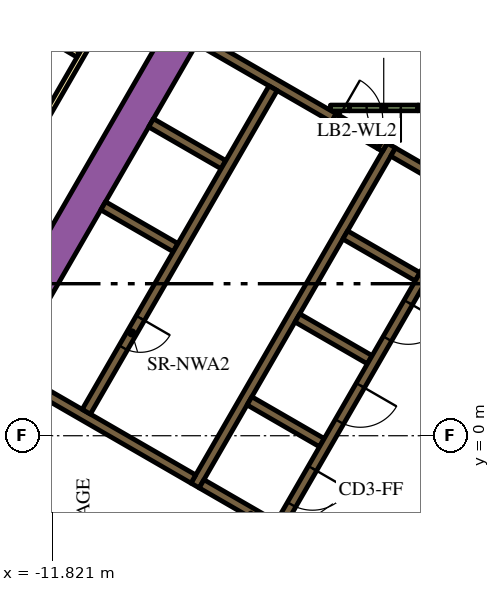
"""IFC4 building model, lengths in metres.
Left out: names, types, materials, properties, quantities, classifications, styles, units other than length and angle.
Written with IfcOpenShell. Run it as: python <this file> out.ifc"""

import sys

from ifc_helpers import new_model, si_unit, direction, frame, frame_2d, origin, place, context, subcontext, project, spatial, polyline, rectangle, outline, extrude, element, fill, save


model = new_model("IFC4")
c1 = context("Model", 3, precision=1e-05, world=origin(), true_north=direction((0.0, 1.0)))
c2 = subcontext(c1, "Body", "Model", "MODEL_VIEW")
j1 = project(units=[si_unit("LENGTHUNIT", "METRE"), si_unit("PLANEANGLEUNIT", "RADIAN")], contexts=[c1])
p1 = place(None, origin())
s1 = spatial("IfcSite", under=j1, at=p1, CompositionType="ELEMENT")
p2 = place(p1, origin())
s2 = spatial("IfcBuilding", under=s1, at=p2, CompositionType="ELEMENT")
p3 = place(p2, frame((0.0, 0.0, 103.2)))
s3 = spatial("IfcBuildingStorey", under=s2, at=p3, CompositionType="ELEMENT", Elevation=103.2)
p4 = place(p3, frame((-15.36, -1.503, 0.0), z_axis=(0.0, 0.0, 1.0), x_axis=(0.50000389221, 0.866023156604, 0.0)))
e1 = element("IfcWall", 1, at=p4, inside=s3, PredefinedType="SOLIDWALL", context=c2, shape_type="SweptSolid", body=[
    extrude(rectangle(XDim=21.0, YDim=0.9, at=frame_2d((10.5, 0.0))), origin(), (0.0, 0.0, 1.0), 3.9),
])
p5 = place(p3, frame((-8.06, -1.311, 0.0), z_axis=(0.0, 0.0, 1.0), x_axis=(0.50000273126, 0.866023826885, 0.0)))
e2 = element("IfcWall", 2, at=p5, inside=s3, PredefinedType="SOLIDWALL", context=c2, shape_type="SweptSolid", body=[
    extrude(rectangle(XDim=10.33, YDim=0.25, at=frame_2d((5.165, 0.0))), origin(), (0.0, 0.0, 1.0), 3.9),
])
p6 = place(p3, frame((-1.76, 6.836, 0.0), z_axis=(0.0, 0.0, 1.0), x_axis=(-0.865952863304, 0.500125622755, 0.0)))
e3 = element("IfcWall", 3, at=p6, inside=s3, PredefinedType="SOLIDWALL", context=c2, shape_type="SweptSolid", body=[
    extrude(rectangle(XDim=1.258, YDim=0.25, at=frame_2d((0.629, 0.0))), origin(), (0.0, 0.0, 1.0), 3.9),
])
for number, where, z_axis, x_axis in (
    (4, (-2.204, 4.182, 0.0), (0.0, 0.0, 1.0), (-0.866, 0.5, 0.0)),
    (5, (-5.369, 3.1, 0.0), (0.0, 0.0, 1.0), (0.866, -0.5, 0.0)),
    (6, (-4.724, -0.182, 0.0), (0.0, 0.0, 1.0), (-0.866, 0.5, 0.0)),
):
    element("IfcWall", number, at=place(p3, frame(where, z_axis=z_axis, x_axis=x_axis)), inside=s3, PredefinedType="SOLIDWALL", context=c2, shape_type="SweptSolid", body=[
        extrude(rectangle(XDim=2.2, YDim=0.25, at=frame_2d((1.1, 0.0))), origin(), (0.0, 0.0, 1.0), 3.9),
    ])
p7 = place(p3, origin())
e7 = element("IfcWall", 7, at=p7, inside=s3, PredefinedType="SOLIDWALL", context=c2, shape_type="SweptSolid", body=[
    extrude(outline(polyline([(-5.922, -2.257), (-5.922, -2.257), (-5.705, -2.382), (-5.83, -2.598), (-6.483, -2.221), (-6.591, -2.033), (-6.591, -2.033), (-6.7, -2.096), (-7.952, -1.373), (-7.827, -1.156), (-5.922, -2.257)])), origin(), (0.0, 0.0, 1.0), 3.9),
])
p8 = place(p3, frame((-8.106, -1.14, 0.0), z_axis=(0.0, 0.0, 1.0), x_axis=(-0.866000643155, 0.500042884217, 0.0)))
e8 = element("IfcWall", 8, at=p8, inside=s3, PredefinedType="SOLIDWALL", context=c2, shape_type="SweptSolid", body=[
    extrude(rectangle(XDim=5.65, YDim=0.25, at=frame_2d((2.825, 0.0))), origin(), (0.0, 0.0, 1.0), 3.9),
])
e9 = element("IfcWall", 9, at=p7, inside=s3, PredefinedType="SOLIDWALL", context=c2, shape_type="SweptSolid", body=[
    extrude(outline(polyline([(-3.128, 7.481), (-3.259, 7.557), (-3.134, 7.773), (-3.003, 7.698), (-3.128, 7.481)])), origin(), (0.0, 0.0, 1.0), 3.9),
])
for number, where, z_axis, x_axis in (
    (10, (-8.574, 4.95, 0.0), (0.0, 0.0, 1.0), (-0.866, 0.5, 0.0)),
    (11, (-7.314, 7.132, 0.0), (0.0, 0.0, 1.0), (-0.866, 0.5, 0.0)),
):
    element("IfcWall", number, at=place(p3, frame(where, z_axis=z_axis, x_axis=x_axis)), inside=s3, PredefinedType="SOLIDWALL", context=c2, shape_type="SweptSolid", body=[
        extrude(rectangle(XDim=2.2, YDim=0.25, at=frame_2d((1.1, 0.0))), origin(), (0.0, 0.0, 1.0), 3.9),
    ])
p9 = place(p3, frame((-7.959, 10.415, 0.0), z_axis=(0.0, 0.0, 1.0), x_axis=(0.866020958405, -0.500007699544, 0.0)))
e12 = element("IfcWall", 12, at=p9, inside=s3, PredefinedType="SOLIDWALL", context=c2, shape_type="SweptSolid", body=[
    extrude(rectangle(XDim=4.1, YDim=0.25, at=frame_2d((2.05, 0.0))), origin(), (0.0, 0.0, 1.0), 3.9),
])
p10 = place(p3, frame((-3.997, 8.625, 0.0), z_axis=(0.0, 0.0, 1.0), x_axis=(-1.0, 0.0, 0.0)))
e13 = element("IfcWall", 13, at=p10, inside=s3, PredefinedType="PARTITIONING", context=c2, shape_type="SweptSolid", body=[
    extrude(rectangle(XDim=0.502, YDim=0.15, at=frame_2d((0.251, 0.0))), origin(), (0.0, 0.0, 1.0), 2.75),
])
p11 = place(p3, frame((-2.196, 8.625, 0.0), z_axis=(0.0, 0.0, 1.0), x_axis=(1.0, 0.0, 0.0)))
e14 = element("IfcWall", 14, at=p11, inside=s3, PredefinedType="PARTITIONING", context=c2, shape_type="SweptSolid", body=[
    extrude(rectangle(XDim=1.146, YDim=0.15, at=frame_2d((0.573, 0.0))), origin(), (0.0, 0.0, 1.0), 2.75),
])
e15 = element("IfcWall", 15, at=p7, inside=s3, PredefinedType="PARTITIONING", context=c2, shape_type="SweptSolid", body=[
    extrude(outline(polyline([(-0.59, -0.872), (-0.265, -1.059), (-1.822, -3.756), (-2.147, -3.568), (-0.59, -0.872)])), origin(), (0.0, 0.0, 1.0), 2.75),
])
p12 = place(p3, frame((-6.008, 9.144, 0.0), z_axis=(0.0, 0.0, 1.0), x_axis=(-0.500006956611, -0.866021387346, 0.0)))
e16 = element("IfcWall", 16, at=p12, inside=s3, PredefinedType="SOLIDWALL", context=c2, shape_type="SweptSolid", body=[
    extrude(rectangle(XDim=9.83, YDim=0.25, at=frame_2d((4.915, 0.0))), origin(), (0.0, 0.0, 1.0), 3.9),
])
p13 = place(p12, frame((6.985, 0.0, 0.0)))
e17 = element("IfcOpeningElement", 17, at=p13, cuts=e16, PredefinedType="OPENING", context=c2, shape_type="SweptSolid", body=[
    extrude(rectangle(XDim=0.9, YDim=2.1, at=frame_2d((0.45, 1.05))), frame((0.0, 0.135, 0.0), z_axis=(0.0, -1.0, 0.0), x_axis=(1.0, 0.0, 0.0)), (0.0, 0.0, 1.0), 0.27),
])
p14 = place(p3, frame((-0.898, 6.194, 0.0), z_axis=(0.0, 0.0, 1.0), x_axis=(-0.499996202215, -0.866027596426, 0.0)))
e18 = element("IfcWall", 18, at=p14, inside=s3, PredefinedType="SOLIDWALL", context=c2, shape_type="SweptSolid", body=[
    extrude(rectangle(XDim=9.83, YDim=0.25, at=frame_2d((4.915, 0.0))), origin(), (0.0, 0.0, 1.0), 3.9),
])
p15 = place(p14, frame((0.585, 0.0, 0.0)))
e19 = element("IfcOpeningElement", 19, at=p15, cuts=e18, PredefinedType="OPENING", context=c2, shape_type="SweptSolid", body=[
    extrude(rectangle(XDim=1.1, YDim=2.1, at=frame_2d((0.55, 1.05))), frame((0.0, 0.135, 0.0), z_axis=(0.0, -1.0, 0.0), x_axis=(1.0, 0.0, 0.0)), (0.0, 0.0, 1.0), 0.27),
])
p16 = place(p14, frame((3.105, 0.0, 0.0)))
e20 = element("IfcOpeningElement", 20, at=p16, cuts=e18, PredefinedType="OPENING", context=c2, shape_type="SweptSolid", body=[
    extrude(rectangle(XDim=1.1, YDim=2.1, at=frame_2d((0.55, 1.05))), frame((0.0, 0.135, 0.0), z_axis=(0.0, -1.0, 0.0), x_axis=(1.0, 0.0, 0.0)), (0.0, 0.0, 1.0), 0.27),
])
p17 = place(p14, frame((5.625, 0.0, 0.0)))
e21 = element("IfcOpeningElement", 21, at=p17, cuts=e18, PredefinedType="OPENING", context=c2, shape_type="SweptSolid", body=[
    extrude(rectangle(XDim=1.1, YDim=2.1, at=frame_2d((0.55, 1.05))), frame((0.0, 0.135, 0.0), z_axis=(0.0, -1.0, 0.0), x_axis=(1.0, 0.0, 0.0)), (0.0, 0.0, 1.0), 0.27),
])
p18 = place(p14, frame((8.145, 0.0, 0.0)))
e22 = element("IfcOpeningElement", 22, at=p18, cuts=e18, PredefinedType="OPENING", context=c2, shape_type="SweptSolid", body=[
    extrude(rectangle(XDim=1.1, YDim=2.1, at=frame_2d((0.55, 1.05))), frame((0.0, 0.135, 0.0), z_axis=(0.0, -1.0, 0.0), x_axis=(1.0, 0.0, 0.0)), (0.0, 0.0, 1.0), 0.27),
])
p19 = place(p3, frame((-2.196, 8.625, 0.0), z_axis=(0.0, 0.0, 1.0), x_axis=(-1.0, 0.0, 0.0)))
e23 = element("IfcWall", 23, at=p19, inside=s3, PredefinedType="PARTITIONING", context=c2, shape_type="SweptSolid", body=[
    extrude(rectangle(XDim=1.8, YDim=0.15, at=frame_2d((0.9, 0.0))), origin(), (0.0, 0.0, 1.0), 2.75),
])
p20 = place(p19, frame((0.45, 0.0, 0.0)))
e24 = element("IfcOpeningElement", 24, at=p20, cuts=e23, PredefinedType="OPENING", context=c2, shape_type="SweptSolid", body=[
    extrude(rectangle(XDim=0.9, YDim=2.1, at=frame_2d((0.45, 1.05))), frame((0.0, 0.085, 0.0), z_axis=(0.0, -1.0, 0.0), x_axis=(1.0, 0.0, 0.0)), (0.0, 0.0, 1.0), 0.17),
])
p21 = place(p3, frame((-4.409, 8.365, 0.0), z_axis=(0.0, 0.0, 1.0), x_axis=(0.866034573852, -0.49998411664, 0.0)))
e25 = element("IfcWall", 25, at=p21, inside=s3, PredefinedType="SOLIDWALL", context=c2, shape_type="SweptSolid", body=[
    extrude(rectangle(XDim=1.4, YDim=0.25, at=frame_2d((0.7, 0.0))), origin(), (0.0, 0.0, 1.0), 3.9),
])
p22 = place(p21, frame((0.1, 0.0, 0.0)))
e26 = element("IfcOpeningElement", 26, at=p22, cuts=e25, PredefinedType="OPENING", context=c2, shape_type="SweptSolid", body=[
    extrude(rectangle(XDim=1.2, YDim=2.1, at=frame_2d((0.6, 1.05))), frame((0.0, 0.135, 0.0), z_axis=(0.0, -1.0, 0.0), x_axis=(1.0, 0.0, 0.0)), (0.0, 0.0, 1.0), 0.27),
])
p23 = place(p3, frame((-19.081, -3.9, 0.0), z_axis=(0.0, 0.0, 1.0), x_axis=(0.499998313975, 0.866026377209, 0.0)))
e27 = element("IfcWall", 27, at=p23, inside=s3, PredefinedType="PARTITIONING", context=c2, shape_type="SweptSolid", body=[
    extrude(rectangle(XDim=25.766, YDim=0.15, at=frame_2d((12.883, 0.0))), origin(), (0.0, 0.0, 1.0), 2.75),
])
p24 = place(p23, frame((19.306, 0.0, 0.0)))
e28 = element("IfcOpeningElement", 28, at=p24, cuts=e27, PredefinedType="OPENING", context=c2, shape_type="SweptSolid", body=[
    extrude(rectangle(XDim=1.0, YDim=2.1, at=frame_2d((0.5, 1.05))), frame((0.0, 0.085, 0.0), z_axis=(0.0, -1.0, 0.0), x_axis=(1.0, 0.0, 0.0)), (0.0, 0.0, 1.0), 0.17),
])
p25 = place(p23, frame((17.144, 0.0, 0.0)))
e29 = element("IfcOpeningElement", 29, at=p25, cuts=e27, PredefinedType="OPENING", context=c2, shape_type="SweptSolid", body=[
    extrude(rectangle(XDim=0.9, YDim=2.1, at=frame_2d((0.45, 1.05))), frame((0.0, 0.085, 0.0), z_axis=(0.0, -1.0, 0.0), x_axis=(1.0, 0.0, 0.0)), (0.0, 0.0, 1.0), 0.17),
])
p26 = place(p23, frame((9.955, 0.0, 0.0)))
e30 = element("IfcOpeningElement", 30, at=p26, cuts=e27, PredefinedType="OPENING", context=c2, shape_type="SweptSolid", body=[
    extrude(rectangle(XDim=1.1, YDim=2.1, at=frame_2d((0.55, 1.05))), frame((0.0, 0.085, 0.0), z_axis=(0.0, -1.0, 0.0), x_axis=(1.0, 0.0, 0.0)), (0.0, 0.0, 1.0), 0.17),
])
p27 = place(p23, frame((8.648, 0.0, 0.0)))
e31 = element("IfcOpeningElement", 31, at=p27, cuts=e27, PredefinedType="OPENING", context=c2, shape_type="SweptSolid", body=[
    extrude(rectangle(XDim=1.0, YDim=2.1, at=frame_2d((0.5, 1.05))), frame((0.0, 0.085, 0.0), z_axis=(0.0, -1.0, 0.0), x_axis=(1.0, 0.0, 0.0)), (0.0, 0.0, 1.0), 0.17),
])
p28 = place(p23, frame((1.553, 0.0, 0.0)))
e32 = element("IfcOpeningElement", 32, at=p28, cuts=e27, PredefinedType="OPENING", context=c2, shape_type="SweptSolid", body=[
    extrude(rectangle(XDim=0.9, YDim=2.1, at=frame_2d((0.45, 1.05))), frame((0.0, 0.085, 0.0), z_axis=(0.0, -1.0, 0.0), x_axis=(1.0, 0.0, 0.0)), (0.0, 0.0, 1.0), 0.17),
])
p29 = place(p3, frame((-17.379, 13.731, 0.0), z_axis=(0.0, 0.0, 1.0), x_axis=(0.860132461691, -0.510070728768, 0.0)))
e33 = element("IfcWall", 33, at=p29, inside=s3, PredefinedType="PARTITIONING", context=c2, shape_type="SweptSolid", body=[
    extrude(rectangle(XDim=7.257, YDim=0.15, at=frame_2d((3.628, 0.0))), origin(), (0.0, 0.0, 1.0), 2.75),
])
p30 = place(p13, origin())
e34 = element("IfcDoor", 34, at=p30, inside=s3, OperationType="SINGLE_SWING_LEFT", PredefinedType="DOOR", context=c2, shape_type="SweptSolid", body=[
    extrude(rectangle(XDim=0.9, YDim=2.1, at=frame_2d((0.45, 1.05))), frame((0.0, 0.025, 0.0), z_axis=(0.0, -1.0, 0.0), x_axis=(1.0, 0.0, 0.0)), (0.0, 0.0, 1.0), 0.05),
])
fill(e17, e34)
p31 = place(p16, origin())
e35 = element("IfcDoor", 35, at=p31, inside=s3, OperationType="DOUBLE_DOOR_SLIDING", PredefinedType="DOOR", context=c2, shape_type="SweptSolid", body=[
    extrude(rectangle(XDim=1.1, YDim=2.1, at=frame_2d((0.55, 1.05))), frame((0.0, 0.025, 0.0), z_axis=(0.0, -1.0, 0.0), x_axis=(1.0, 0.0, 0.0)), (0.0, 0.0, 1.0), 0.05),
])
fill(e20, e35)
p32 = place(p17, origin())
e36 = element("IfcDoor", 36, at=p32, inside=s3, OperationType="DOUBLE_DOOR_SLIDING", PredefinedType="DOOR", context=c2, shape_type="SweptSolid", body=[
    extrude(rectangle(XDim=1.1, YDim=2.1, at=frame_2d((0.55, 1.05))), frame((0.0, 0.025, 0.0), z_axis=(0.0, -1.0, 0.0), x_axis=(1.0, 0.0, 0.0)), (0.0, 0.0, 1.0), 0.05),
])
fill(e21, e36)
p33 = place(p18, origin())
e37 = element("IfcDoor", 37, at=p33, inside=s3, OperationType="DOUBLE_DOOR_SLIDING", PredefinedType="DOOR", context=c2, shape_type="SweptSolid", body=[
    extrude(rectangle(XDim=1.1, YDim=2.1, at=frame_2d((0.55, 1.05))), frame((0.0, 0.025, 0.0), z_axis=(0.0, -1.0, 0.0), x_axis=(1.0, 0.0, 0.0)), (0.0, 0.0, 1.0), 0.05),
])
fill(e22, e37)
p34 = place(p20, origin())
e38 = element("IfcDoor", 38, at=p34, inside=s3, OperationType="SINGLE_SWING_LEFT", PredefinedType="DOOR", context=c2, shape_type="SweptSolid", body=[
    extrude(rectangle(XDim=0.9, YDim=2.1, at=frame_2d((0.45, 1.05))), frame((0.0, 0.025, 0.0), z_axis=(0.0, -1.0, 0.0), x_axis=(1.0, 0.0, 0.0)), (0.0, 0.0, 1.0), 0.05),
])
fill(e24, e38)
p35 = place(p22, origin())
e39 = element("IfcDoor", 39, at=p35, inside=s3, OperationType="SINGLE_SWING_LEFT", PredefinedType="DOOR", context=c2, shape_type="SweptSolid", body=[
    extrude(rectangle(XDim=1.2, YDim=2.1, at=frame_2d((0.6, 1.05))), frame((0.0, 0.025, 0.0), z_axis=(0.0, -1.0, 0.0), x_axis=(1.0, 0.0, 0.0)), (0.0, 0.0, 1.0), 0.05),
])
fill(e26, e39)
save(model, sys.argv[1])
